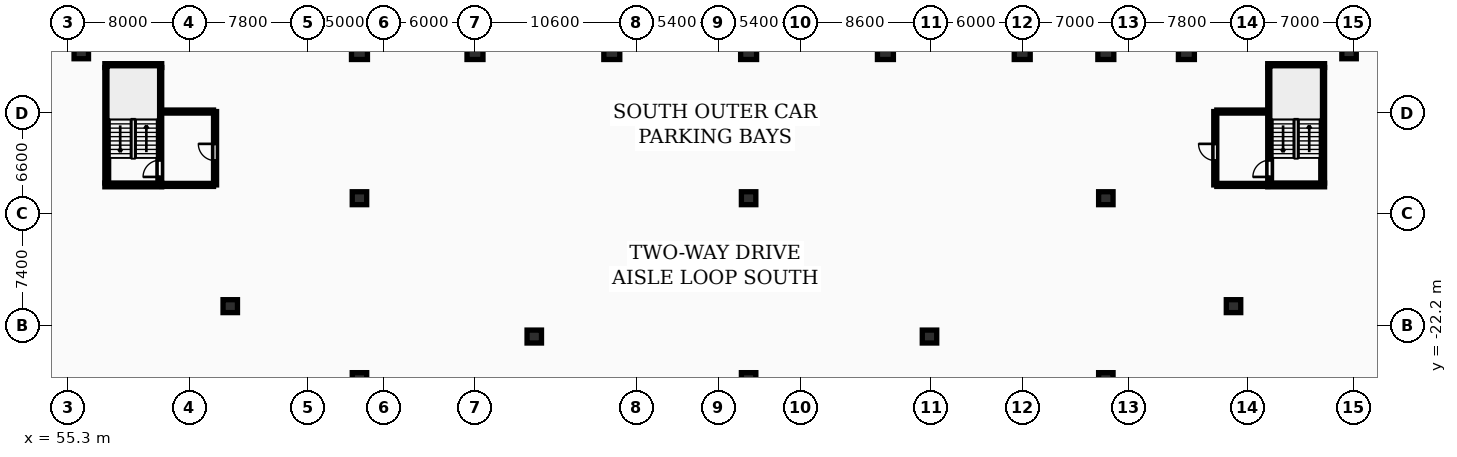
"""IFC4 building model, lengths in metres.
Left out: names, types, materials, properties, quantities, classifications, styles, units other than length and angle.
Written with IfcOpenShell. Run it as: python <this file> out.ifc"""

import sys

from ifc_helpers import new_model, si_unit, direction, frame, frame_2d, origin, origin_2d, place, context, subcontext, project, spatial, rectangle, extrude, element, fill, save


model = new_model("IFC4")
c1 = context("Model", 3, precision=1e-05, world=origin(), true_north=direction((0.0, 1.0)))
c2 = subcontext(c1, "Body", "Model", "MODEL_VIEW")
j1 = project(units=[si_unit("LENGTHUNIT", "METRE"), si_unit("PLANEANGLEUNIT", "RADIAN")], contexts=[c1])
p1 = place(None, origin())
s1 = spatial("IfcSite", under=j1, at=p1, CompositionType="ELEMENT")
p2 = place(p1, origin())
s2 = spatial("IfcBuilding", under=s1, at=p2, CompositionType="ELEMENT")
p3 = place(p2, frame((0.0, 0.0, -10.8)))
s3 = spatial("IfcBuildingStorey", under=s2, at=p3, CompositionType="ELEMENT", Elevation=-10.8)
for number, where, z_axis, x_axis in (
    (1, (74.5, -4.2, -0.45), (0.0, 0.0, 1.0), (1.0, 0.0, 0.0)),
    (2, (82.1, -4.2, -0.45), (0.0, 0.0, 1.0), (1.0, 0.0, 0.0)),
    (3, (91.1, -4.2, -0.45), (0.0, 0.0, 1.0), (1.0, 0.0, 0.0)),
    (4, (100.1, -4.2, -0.45), (0.0, 0.0, 1.0), (1.0, 0.0, 0.0)),
    (5, (109.1, -4.2, -0.45), (0.0, 0.0, 1.0), (1.0, 0.0, 0.0)),
    (6, (118.1, -4.2, -0.45), (0.0, 0.0, 1.0), (1.0, 0.0, 0.0)),
    (7, (123.6, -4.2, -0.45), (0.0, 0.0, 1.0), (1.0, 0.0, 0.0)),
    (8, (128.9, -4.2, -0.45), (0.0, 0.0, 1.0), (1.0, 0.0, 0.0)),
):
    element("IfcColumn", number, at=place(p3, frame(where, z_axis=z_axis, x_axis=x_axis)), inside=s3, PredefinedType="COLUMN", context=c2, shape_type="SweptSolid", body=[
        extrude(rectangle(XDim=1.05, YDim=0.95, at=origin_2d()), origin(), (0.0, 0.0, 1.0), 4.05),
    ])
for number, where, z_axis, x_axis in (
    (9, (56.2, -4.2, -0.45), (0.0, 0.0, 1.0), (1.0, 0.0, 0.0)),
    (10, (139.6, -4.2, -0.45), (0.0, 0.0, 1.0), (1.0, 0.0, 0.0)),
    (11, (74.5, -13.8, -0.45), (0.0, 0.0, 1.0), (1.0, 0.0, 0.0)),
    (12, (100.1, -13.8, -0.45), (0.0, 0.0, 1.0), (1.0, 0.0, 0.0)),
    (13, (123.6, -13.8, -0.45), (0.0, 0.0, 1.0), (1.0, 0.0, 0.0)),
    (14, (86.0, -22.9, -0.45), (0.0, 0.0, 1.0), (1.0, 0.0, 0.0)),
    (15, (112.0, -22.9, -0.45), (0.0, 0.0, 1.0), (1.0, 0.0, 0.0)),
    (16, (66.0, -20.9, -0.45), (0.0, 0.0, 1.0), (1.0, 0.0, 0.0)),
    (17, (132.0, -20.9, -0.45), (0.0, 0.0, 1.0), (1.0, 0.0, 0.0)),
    (18, (74.5, -25.7, -0.45), (0.0, 0.0, 1.0), (1.0, 0.0, 0.0)),
    (19, (100.1, -25.7, -0.45), (0.0, 0.0, 1.0), (1.0, 0.0, 0.0)),
    (20, (123.6, -25.7, -0.45), (0.0, 0.0, 1.0), (1.0, 0.0, 0.0)),
):
    element("IfcColumn", number, at=place(p3, frame(where, z_axis=z_axis, x_axis=x_axis)), inside=s3, PredefinedType="COLUMN", context=c2, shape_type="SweptSolid", body=[
        extrude(rectangle(XDim=0.95, YDim=0.85, at=origin_2d()), origin(), (0.0, 0.0, 1.0), 4.05),
    ])
p4 = place(p3, frame((57.875, -12.8, 0.0), z_axis=(0.0, 0.0, 1.0), x_axis=(0.0, 1.0, 0.0)))
e21 = element("IfcWall", 21, at=p4, inside=s3, PredefinedType="SHEAR", context=c2, shape_type="SweptSolid", body=[
    extrude(rectangle(XDim=7.6, YDim=0.25, at=frame_2d((3.8, 0.0))), origin(), (0.0, 0.0, 1.0), 3.6),
])
for number, where, z_axis, x_axis in (
    (22, (57.75, -12.925, 0.0), (0.0, 0.0, 1.0), (1.0, 0.0, 0.0)),
    (23, (57.75, -5.075, 0.0), (0.0, 0.0, 1.0), (1.0, 0.0, 0.0)),
):
    element("IfcWall", number, at=place(p3, frame(where, z_axis=z_axis, x_axis=x_axis)), inside=s3, PredefinedType="SHEAR", context=c2, shape_type="SweptSolid", body=[
        extrude(rectangle(XDim=3.74, YDim=0.25, at=frame_2d((1.87, 0.0))), origin(), (0.0, 0.0, 1.0), 3.6),
    ])
p5 = place(p3, frame((61.365, -12.8, 0.0), z_axis=(0.0, 0.0, 1.0), x_axis=(0.0, 1.0, 0.0)))
e24 = element("IfcWall", 24, at=p5, inside=s3, PredefinedType="SHEAR", context=c2, shape_type="SweptSolid", body=[
    extrude(rectangle(XDim=7.6, YDim=0.25, at=frame_2d((3.8, 0.0))), origin(), (0.0, 0.0, 1.0), 3.6),
])
p6 = place(p5, frame((0.4, 0.0, 0.0)))
e25 = element("IfcOpeningElement", 25, at=p6, cuts=e24, PredefinedType="OPENING", context=c2, shape_type="SweptSolid", body=[
    extrude(rectangle(XDim=1.1, YDim=2.1, at=frame_2d((0.55, 1.05))), frame((0.0, 0.135, 0.0), z_axis=(0.0, -1.0, 0.0), x_axis=(1.0, 0.0, 0.0)), (0.0, 0.0, 1.0), 0.27),
])
p7 = place(p3, frame((65.0, -12.925, 0.0), z_axis=(0.0, 0.0, 1.0), x_axis=(0.0, 1.0, 0.0)))
e26 = element("IfcWall", 26, at=p7, inside=s3, PredefinedType="PARTITIONING", context=c2, shape_type="SweptSolid", body=[
    extrude(rectangle(XDim=4.825, YDim=0.2, at=frame_2d((2.413, 0.0))), origin(), (0.0, 0.0, 1.0), 3.3),
])
p8 = place(p7, frame((1.6, 0.0, 0.0)))
e27 = element("IfcOpeningElement", 27, at=p8, cuts=e26, PredefinedType="OPENING", context=c2, shape_type="SweptSolid", body=[
    extrude(rectangle(XDim=1.1, YDim=2.15, at=frame_2d((0.55, 1.075))), frame((0.0, 0.11, 0.0), z_axis=(0.0, -1.0, 0.0), x_axis=(1.0, 0.0, 0.0)), (0.0, 0.0, 1.0), 0.22),
])
for number, where, z_axis, x_axis in (
    (28, (61.5, -12.925, 0.0), (0.0, 0.0, 1.0), (1.0, 0.0, 0.0)),
    (29, (61.5, -8.1, 0.0), (0.0, 0.0, 1.0), (1.0, 0.0, 0.0)),
):
    element("IfcWall", number, at=place(p3, frame(where, z_axis=z_axis, x_axis=x_axis)), inside=s3, PredefinedType="PARTITIONING", context=c2, shape_type="SweptSolid", body=[
        extrude(rectangle(XDim=3.4, YDim=0.2, at=frame_2d((1.7, 0.0))), origin(), (0.0, 0.0, 1.0), 3.3),
    ])
p9 = place(p3, frame((134.375, -12.8, 0.0), z_axis=(0.0, 0.0, 1.0), x_axis=(0.0, 1.0, 0.0)))
e30 = element("IfcWall", 30, at=p9, inside=s3, PredefinedType="SHEAR", context=c2, shape_type="SweptSolid", body=[
    extrude(rectangle(XDim=7.6, YDim=0.25, at=frame_2d((3.8, 0.0))), origin(), (0.0, 0.0, 1.0), 3.6),
])
p10 = place(p9, frame((0.4, 0.0, 0.0)))
e31 = element("IfcOpeningElement", 31, at=p10, cuts=e30, PredefinedType="OPENING", context=c2, shape_type="SweptSolid", body=[
    extrude(rectangle(XDim=1.1, YDim=2.1, at=frame_2d((0.55, 1.05))), frame((0.0, 0.135, 0.0), z_axis=(0.0, -1.0, 0.0), x_axis=(1.0, 0.0, 0.0)), (0.0, 0.0, 1.0), 0.27),
])
p11 = place(p3, frame((137.865, -12.8, 0.0), z_axis=(0.0, 0.0, 1.0), x_axis=(0.0, 1.0, 0.0)))
e32 = element("IfcWall", 32, at=p11, inside=s3, PredefinedType="SHEAR", context=c2, shape_type="SweptSolid", body=[
    extrude(rectangle(XDim=7.6, YDim=0.25, at=frame_2d((3.8, 0.0))), origin(), (0.0, 0.0, 1.0), 3.6),
])
for number, where, z_axis, x_axis in (
    (33, (134.25, -12.925, 0.0), (0.0, 0.0, 1.0), (1.0, 0.0, 0.0)),
    (34, (134.25, -5.075, 0.0), (0.0, 0.0, 1.0), (1.0, 0.0, 0.0)),
):
    element("IfcWall", number, at=place(p3, frame(where, z_axis=z_axis, x_axis=x_axis)), inside=s3, PredefinedType="SHEAR", context=c2, shape_type="SweptSolid", body=[
        extrude(rectangle(XDim=3.74, YDim=0.25, at=frame_2d((1.87, 0.0))), origin(), (0.0, 0.0, 1.0), 3.6),
    ])
p12 = place(p3, frame((130.8, -12.925, 0.0), z_axis=(0.0, 0.0, 1.0), x_axis=(0.0, 1.0, 0.0)))
e35 = element("IfcWall", 35, at=p12, inside=s3, PredefinedType="PARTITIONING", context=c2, shape_type="SweptSolid", body=[
    extrude(rectangle(XDim=4.825, YDim=0.2, at=frame_2d((2.413, 0.0))), origin(), (0.0, 0.0, 1.0), 3.3),
])
p13 = place(p12, frame((1.6, 0.0, 0.0)))
e36 = element("IfcOpeningElement", 36, at=p13, cuts=e35, PredefinedType="OPENING", context=c2, shape_type="SweptSolid", body=[
    extrude(rectangle(XDim=1.1, YDim=2.15, at=frame_2d((0.55, 1.075))), frame((0.0, 0.11, 0.0), z_axis=(0.0, -1.0, 0.0), x_axis=(1.0, 0.0, 0.0)), (0.0, 0.0, 1.0), 0.22),
])
for number, where, z_axis, x_axis in (
    (37, (130.9, -12.925, 0.0), (0.0, 0.0, 1.0), (1.0, 0.0, 0.0)),
    (38, (130.9, -8.1, 0.0), (0.0, 0.0, 1.0), (1.0, 0.0, 0.0)),
):
    element("IfcWall", number, at=place(p3, frame(where, z_axis=z_axis, x_axis=x_axis)), inside=s3, PredefinedType="PARTITIONING", context=c2, shape_type="SweptSolid", body=[
        extrude(rectangle(XDim=3.35, YDim=0.2, at=frame_2d((1.675, 0.0))), origin(), (0.0, 0.0, 1.0), 3.3),
    ])
p14 = place(p6, origin())
e39 = element("IfcDoor", 39, at=p14, inside=s3, OperationType="SINGLE_SWING_LEFT", PredefinedType="DOOR", context=c2, shape_type="SweptSolid", body=[
    extrude(rectangle(XDim=1.1, YDim=2.1, at=frame_2d((0.55, 1.05))), frame((0.0, 0.025, 0.0), z_axis=(0.0, -1.0, 0.0), x_axis=(1.0, 0.0, 0.0)), (0.0, 0.0, 1.0), 0.05),
])
fill(e25, e39)
p15 = place(p8, origin())
e40 = element("IfcDoor", 40, at=p15, inside=s3, OperationType="SINGLE_SWING_RIGHT", PredefinedType="DOOR", context=c2, shape_type="SweptSolid", body=[
    extrude(rectangle(XDim=1.1, YDim=2.15, at=frame_2d((0.55, 1.075))), frame((0.0, 0.025, 0.0), z_axis=(0.0, -1.0, 0.0), x_axis=(1.0, 0.0, 0.0)), (0.0, 0.0, 1.0), 0.05),
])
fill(e27, e40)
p16 = place(p10, origin())
e41 = element("IfcDoor", 41, at=p16, inside=s3, OperationType="SINGLE_SWING_LEFT", PredefinedType="DOOR", context=c2, shape_type="SweptSolid", body=[
    extrude(rectangle(XDim=1.1, YDim=2.1, at=frame_2d((0.55, 1.05))), frame((0.0, 0.025, 0.0), z_axis=(0.0, -1.0, 0.0), x_axis=(1.0, 0.0, 0.0)), (0.0, 0.0, 1.0), 0.05),
])
fill(e31, e41)
p17 = place(p13, origin())
e42 = element("IfcDoor", 42, at=p17, inside=s3, OperationType="SINGLE_SWING_RIGHT", PredefinedType="DOOR", context=c2, shape_type="SweptSolid", body=[
    extrude(rectangle(XDim=1.1, YDim=2.15, at=frame_2d((0.55, 1.075))), frame((0.0, 0.025, 0.0), z_axis=(0.0, -1.0, 0.0), x_axis=(1.0, 0.0, 0.0)), (0.0, 0.0, 1.0), 0.05),
])
fill(e36, e42)
save(model, sys.argv[1])
